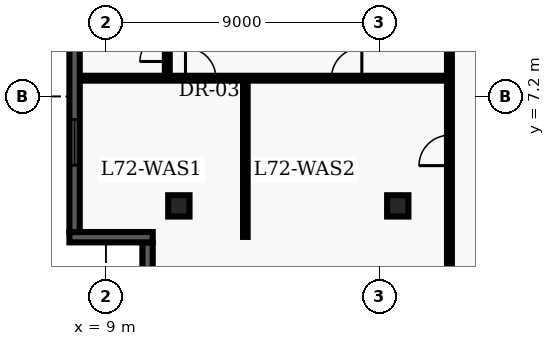
"""IFC4 building model, lengths in metres.
Left out: names, types, materials, properties, quantities, classifications, styles, units other than length and angle.
Written with IfcOpenShell. Run it as: python <this file> out.ifc"""

import sys

from ifc_helpers import new_model, entity, si_unit, converted_unit, direction, frame, origin_with_axes, origin_2d_with_axis, place, context, subcontext, project, spatial, polyline, rectangle, outline, extrude, element, fill, save


model = new_model("IFC4")
c1 = context("Model", 3, precision=1e-05, world=origin_with_axes(), true_north=direction((0.0, 1.0)))
c2 = subcontext(c1, "Body", "Model", "MODEL_VIEW")
j1 = project(units=[si_unit("LENGTHUNIT", "METRE"), converted_unit("PLANEANGLEUNIT", "DEGREE", entity("IfcPlaneAngleMeasure", 0.017), si_unit("PLANEANGLEUNIT", "RADIAN"), dimensions=[0, 0, 0, 0, 0, 0, 0])], contexts=[c1])
p1 = place(None, origin_with_axes())
s1 = spatial("IfcSite", under=j1, at=p1, CompositionType="ELEMENT")
p2 = place(p1, origin_with_axes())
s2 = spatial("IfcBuilding", under=s1, at=p2, CompositionType="ELEMENT")
p3 = place(p2, frame((0.0, 0.0, 291.9), z_axis=(0.0, 0.0, 1.0), x_axis=(1.0, 0.0, 0.0)))
s3 = spatial("IfcBuildingStorey", under=s2, at=p3, CompositionType="ELEMENT", Elevation=291.9)
for number, where, z_axis, x_axis in (
    (1, (11.4, 3.6, 0.0), (0.0, 0.0, 1.0), (1.0, 0.0, 0.0)),
    (2, (18.6, 3.6, 0.0), (0.0, 0.0, 1.0), (1.0, 0.0, 0.0)),
):
    element("IfcColumn", number, at=place(p3, frame(where, z_axis=z_axis, x_axis=x_axis)), inside=s3, PredefinedType="COLUMN", context=c2, shape_type="SweptSolid", body=[
        extrude(rectangle(XDim=0.7, YDim=0.7, at=origin_2d_with_axis()), origin_with_axes(), (0.0, 0.0, 1.0), 3.9),
    ])
p4 = place(p3, frame((8.135, 7.8, 0.0), z_axis=(0.0, 0.0, 1.0), x_axis=(1.0, 0.0, 0.0)))
e3 = element("IfcWall", 3, at=p4, inside=s3, PredefinedType="PARTITIONING", context=c2, shape_type="SweptSolid", body=[
    extrude(outline(polyline([(0.0, -0.08), (12.165, -0.08), (12.165, 0.08), (0.0, 0.08), (0.0, -0.08)])), origin_with_axes(), (0.0, 0.0, 1.0), 2.7),
])
p5 = place(p4, frame((3.983, 0.0, 0.0), z_axis=(0.0, 0.0, 1.0), x_axis=(1.0, 0.0, 0.0)))
e4 = element("IfcOpeningElement", 4, at=p5, cuts=e3, PredefinedType="OPENING", context=c2, shape_type="SweptSolid", body=[
    extrude(rectangle(XDim=1.0, YDim=0.18, at=origin_2d_with_axis()), origin_with_axes(), (0.0, 0.0, 1.0), 2.15),
])
p6 = place(p4, frame((8.784, 0.0, 0.0), z_axis=(0.0, 0.0, 1.0), x_axis=(1.0, 0.0, 0.0)))
e5 = element("IfcOpeningElement", 5, at=p6, cuts=e3, PredefinedType="OPENING", context=c2, shape_type="SweptSolid", body=[
    extrude(rectangle(XDim=1.0, YDim=0.18, at=origin_2d_with_axis()), origin_with_axes(), (0.0, 0.0, 1.0), 2.15),
])
p7 = place(p3, frame((20.3, 0.335, 0.0), z_axis=(0.0, 0.0, 1.0), x_axis=(0.0, 1.0, 0.0)))
e6 = element("IfcWall", 6, at=p7, inside=s3, PredefinedType="PARTITIONING", context=c2, shape_type="SweptSolid", body=[
    extrude(outline(polyline([(0.0, -0.08), (40.165, -0.08), (40.165, 0.08), (0.0, 0.08), (0.0, -0.08)])), origin_with_axes(), (0.0, 0.0, 1.0), 2.7),
])
p8 = place(p7, frame((32.49, 0.0, 0.0), z_axis=(0.0, 0.0, 1.0), x_axis=(1.0, 0.0, 0.0)))
e7 = element("IfcOpeningElement", 7, at=p8, cuts=e6, PredefinedType="OPENING", context=c2, shape_type="SweptSolid", body=[
    extrude(rectangle(XDim=1.05, YDim=0.18, at=origin_2d_with_axis()), origin_with_axes(), (0.0, 0.0, 1.0), 2.15),
])
p9 = place(p7, frame((5.089, 0.0, 0.0), z_axis=(0.0, 0.0, 1.0), x_axis=(1.0, 0.0, 0.0)))
e8 = element("IfcOpeningElement", 8, at=p9, cuts=e6, PredefinedType="OPENING", context=c2, shape_type="SweptSolid", body=[
    extrude(rectangle(XDim=1.0, YDim=0.18, at=origin_2d_with_axis()), origin_with_axes(), (0.0, 0.0, 1.0), 2.15),
])
p10 = place(p7, frame((17.578, 0.0, 0.0), z_axis=(0.0, 0.0, 1.0), x_axis=(1.0, 0.0, 0.0)))
e9 = element("IfcOpeningElement", 9, at=p10, cuts=e6, PredefinedType="OPENING", context=c2, shape_type="SweptSolid", body=[
    extrude(rectangle(XDim=1.0, YDim=0.18, at=origin_2d_with_axis()), origin_with_axes(), (0.0, 0.0, 1.0), 2.15),
])
p11 = place(p7, frame((25.079, 0.0, 0.0), z_axis=(0.0, 0.0, 1.0), x_axis=(1.0, 0.0, 0.0)))
e10 = element("IfcOpeningElement", 10, at=p11, cuts=e6, PredefinedType="OPENING", context=c2, shape_type="SweptSolid", body=[
    extrude(rectangle(XDim=1.0, YDim=0.18, at=origin_2d_with_axis()), origin_with_axes(), (0.0, 0.0, 1.0), 2.15),
])
p12 = place(p3, frame((11.02, 7.8, 0.0), z_axis=(0.0, 0.0, 1.0), x_axis=(0.0, 1.0, 0.0)))
e11 = element("IfcWall", 11, at=p12, inside=s3, PredefinedType="PARTITIONING", context=c2, shape_type="SweptSolid", body=[
    extrude(outline(polyline([(0.0, -0.08), (2.85, -0.08), (2.85, 0.08), (0.0, 0.08), (0.0, -0.08)])), origin_with_axes(), (0.0, 0.0, 1.0), 2.7),
])
p13 = place(p12, frame((1.0, 0.0, 0.0), z_axis=(0.0, 0.0, 1.0), x_axis=(1.0, 0.0, 0.0)))
e12 = element("IfcOpeningElement", 12, at=p13, cuts=e11, PredefinedType="OPENING", context=c2, shape_type="SweptSolid", body=[
    extrude(rectangle(XDim=0.9, YDim=0.18, at=origin_2d_with_axis()), origin_with_axes(), (0.0, 0.0, 1.0), 2.15),
])
p14 = place(p3, frame((13.587, 2.58, 0.0), z_axis=(0.0, 0.0, 1.0), x_axis=(0.0, 1.0, 0.0)))
e13 = element("IfcWall", 13, at=p14, inside=s3, PredefinedType="PARTITIONING", context=c2, shape_type="SweptSolid", body=[
    extrude(outline(polyline([(0.0, -0.075), (5.12, -0.075), (5.12, 0.075), (0.0, 0.075), (0.0, -0.075)])), origin_with_axes(), (0.0, 0.0, 1.0), 2.7),
])
p15 = place(p3, frame((10.37, 0.34, 0.0), z_axis=(0.0, 0.0, 1.0), x_axis=(0.0, 1.0, 0.0)))
e14 = element("IfcWall", 14, at=p15, inside=s3, PredefinedType="SOLIDWALL", context=c2, shape_type="SweptSolid", body=[
    extrude(outline(polyline([(0.0, -0.17), (2.06, -0.17), (2.06, 0.17), (0.0, 0.17), (0.0, -0.17)])), origin_with_axes(), (0.0, 0.0, 1.0), 3.66),
])
p16 = place(p3, frame((10.54, 2.57, 0.0), z_axis=(0.0, 0.0, 1.0), x_axis=(-1.0, 0.0, 0.0)))
e15 = element("IfcWall", 15, at=p16, inside=s3, PredefinedType="SOLIDWALL", context=c2, shape_type="SweptSolid", body=[
    extrude(outline(polyline([(0.0, -0.17), (2.74, -0.17), (2.74, 0.17), (0.0, 0.17), (0.0, -0.17)])), origin_with_axes(), (0.0, 0.0, 1.0), 3.66),
])
p17 = place(p3, frame((7.97, 2.74, 0.0), z_axis=(0.0, 0.0, 1.0), x_axis=(0.0, 1.0, 0.0)))
e16 = element("IfcWall", 16, at=p17, inside=s3, PredefinedType="SOLIDWALL", context=c2, shape_type="SweptSolid", body=[
    extrude(outline(polyline([(0.0, -0.17), (43.46, -0.17), (43.46, 0.17), (0.0, 0.17), (0.0, -0.17)])), origin_with_axes(), (0.0, 0.0, 1.0), 3.66),
])
p18 = place(p17, frame((2.948, 0.0, 0.45), z_axis=(0.0, 0.0, 1.0), x_axis=(1.0, 0.0, 0.0)))
e17 = element("IfcOpeningElement", 17, at=p18, cuts=e16, PredefinedType="OPENING", context=c2, shape_type="SweptSolid", body=[
    extrude(rectangle(XDim=1.5, YDim=0.36, at=origin_2d_with_axis()), origin_with_axes(), (0.0, 0.0, 1.0), 2.1),
])
p19 = place(p17, frame((7.643, 0.0, 0.45), z_axis=(0.0, 0.0, 1.0), x_axis=(1.0, 0.0, 0.0)))
e18 = element("IfcOpeningElement", 18, at=p19, cuts=e16, PredefinedType="OPENING", context=c2, shape_type="SweptSolid", body=[
    extrude(rectangle(XDim=1.5, YDim=0.36, at=origin_2d_with_axis()), origin_with_axes(), (0.0, 0.0, 1.0), 2.1),
])
p20 = place(p17, frame((12.339, 0.0, 0.45), z_axis=(0.0, 0.0, 1.0), x_axis=(1.0, 0.0, 0.0)))
e19 = element("IfcOpeningElement", 19, at=p20, cuts=e16, PredefinedType="OPENING", context=c2, shape_type="SweptSolid", body=[
    extrude(rectangle(XDim=1.5, YDim=0.36, at=origin_2d_with_axis()), origin_with_axes(), (0.0, 0.0, 1.0), 2.1),
])
p21 = place(p17, frame((21.73, 0.0, 0.45), z_axis=(0.0, 0.0, 1.0), x_axis=(1.0, 0.0, 0.0)))
e20 = element("IfcOpeningElement", 20, at=p21, cuts=e16, PredefinedType="OPENING", context=c2, shape_type="SweptSolid", body=[
    extrude(rectangle(XDim=1.5, YDim=0.36, at=origin_2d_with_axis()), origin_with_axes(), (0.0, 0.0, 1.0), 2.1),
])
p22 = place(p17, frame((31.121, 0.0, 0.45), z_axis=(0.0, 0.0, 1.0), x_axis=(1.0, 0.0, 0.0)))
e21 = element("IfcOpeningElement", 21, at=p22, cuts=e16, PredefinedType="OPENING", context=c2, shape_type="SweptSolid", body=[
    extrude(rectangle(XDim=1.5, YDim=0.36, at=origin_2d_with_axis()), origin_with_axes(), (0.0, 0.0, 1.0), 2.1),
])
p23 = place(p17, frame((35.817, 0.0, 0.45), z_axis=(0.0, 0.0, 1.0), x_axis=(1.0, 0.0, 0.0)))
e22 = element("IfcOpeningElement", 22, at=p23, cuts=e16, PredefinedType="OPENING", context=c2, shape_type="SweptSolid", body=[
    extrude(rectangle(XDim=1.5, YDim=0.36, at=origin_2d_with_axis()), origin_with_axes(), (0.0, 0.0, 1.0), 2.1),
])
p24 = place(p17, frame((40.512, 0.0, 0.45), z_axis=(0.0, 0.0, 1.0), x_axis=(1.0, 0.0, 0.0)))
e23 = element("IfcOpeningElement", 23, at=p24, cuts=e16, PredefinedType="OPENING", context=c2, shape_type="SweptSolid", body=[
    extrude(rectangle(XDim=1.5, YDim=0.36, at=origin_2d_with_axis()), origin_with_axes(), (0.0, 0.0, 1.0), 2.1),
])
p25 = place(p12, frame((1.0, 0.0, 0.0), z_axis=(0.0, 0.0, 1.0), x_axis=(1.0, 0.0, 0.0)))
e24 = element("IfcDoor", 24, at=p25, inside=s3, OperationType="SINGLE_SWING_LEFT", PredefinedType="DOOR", context=c2, shape_type="SweptSolid", body=[
    extrude(rectangle(XDim=0.9, YDim=0.09, at=origin_2d_with_axis()), origin_with_axes(), (0.0, 0.0, 1.0), 2.15),
])
fill(e12, e24)
p26 = place(p4, frame((3.983, 0.0, 0.0), z_axis=(0.0, 0.0, 1.0), x_axis=(1.0, 0.0, 0.0)))
e25 = element("IfcDoor", 25, at=p26, inside=s3, OperationType="SINGLE_SWING_LEFT", PredefinedType="DOOR", context=c2, shape_type="SweptSolid", body=[
    extrude(rectangle(XDim=1.0, YDim=0.09, at=origin_2d_with_axis()), origin_with_axes(), (0.0, 0.0, 1.0), 2.15),
])
fill(e4, e25)
p27 = place(p4, frame((8.784, 0.0, 0.0), z_axis=(0.0, 0.0, 1.0), x_axis=(1.0, 0.0, 0.0)))
e26 = element("IfcDoor", 26, at=p27, inside=s3, OperationType="SINGLE_SWING_RIGHT", PredefinedType="DOOR", context=c2, shape_type="SweptSolid", body=[
    extrude(rectangle(XDim=1.0, YDim=0.09, at=origin_2d_with_axis()), origin_with_axes(), (0.0, 0.0, 1.0), 2.15),
])
fill(e5, e26)
p28 = place(p7, frame((5.089, 0.0, 0.0), z_axis=(0.0, 0.0, 1.0), x_axis=(1.0, 0.0, 0.0)))
e27 = element("IfcDoor", 27, at=p28, inside=s3, OperationType="SINGLE_SWING_LEFT", PredefinedType="DOOR", context=c2, shape_type="SweptSolid", body=[
    extrude(rectangle(XDim=1.0, YDim=0.09, at=origin_2d_with_axis()), origin_with_axes(), (0.0, 0.0, 1.0), 2.15),
])
fill(e8, e27)
p29 = place(p17, frame((2.948, 0.0, 0.45), z_axis=(0.0, 0.0, 1.0), x_axis=(1.0, 0.0, 0.0)))
e28 = element("IfcWindow", 28, at=p29, inside=s3, PredefinedType="WINDOW", context=c2, shape_type="SweptSolid", body=[
    extrude(rectangle(XDim=1.5, YDim=0.09, at=origin_2d_with_axis()), origin_with_axes(), (0.0, 0.0, 1.0), 2.1),
])
fill(e17, e28)
save(model, sys.argv[1])
